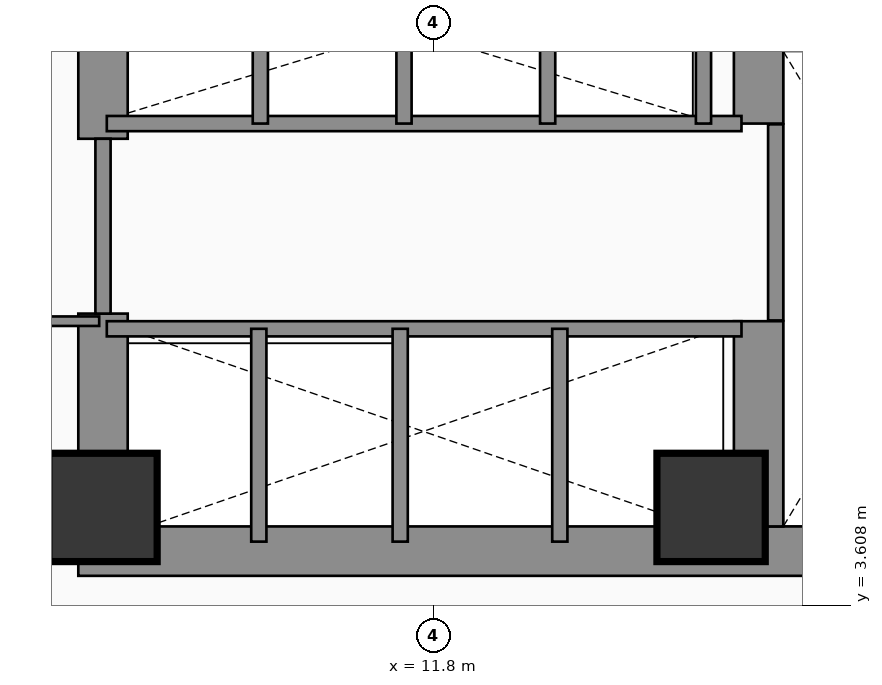
"""IFC4 building model, lengths in metres.
Left out: names, types, materials, properties, quantities, classifications, styles, units other than length and angle.
Written with IfcOpenShell. Run it as: python <this file> out.ifc"""

import sys

from ifc_helpers import new_model, si_unit, direction, frame, frame_2d, origin, origin_2d, place, context, subcontext, project, spatial, rectangle, extrude, element, fill, save


model = new_model("IFC4")
c1 = context("Model", 3, precision=1e-05, world=origin(), true_north=direction((0.0, 1.0)))
c2 = subcontext(c1, "Body", "Model", "MODEL_VIEW")
j1 = project(units=[si_unit("LENGTHUNIT", "METRE"), si_unit("PLANEANGLEUNIT", "RADIAN")], contexts=[c1])
p1 = place(None, origin())
s1 = spatial("IfcSite", under=j1, at=p1, CompositionType="ELEMENT")
p2 = place(p1, origin())
s2 = spatial("IfcBuilding", under=s1, at=p2, CompositionType="ELEMENT")
p3 = place(p2, frame((0.0, 0.0, 110.7)))
s3 = spatial("IfcBuildingStorey", under=s2, at=p3, CompositionType="ELEMENT", Elevation=110.7)
p4 = place(p3, frame((7.125, 4.325, 0.0), z_axis=(0.0, 0.0, 1.0), x_axis=(1.0, 0.0, 0.0)))
e1 = element("IfcWall", 1, at=p4, inside=s3, PredefinedType="SHEAR", context=c2, shape_type="SweptSolid", body=[
    extrude(rectangle(XDim=14.0, YDim=0.65, at=frame_2d((7.0, 0.0))), origin(), (0.0, 0.0, 1.0), 3.54),
])
p5 = place(p3, frame((7.45, 4.65, 0.0), z_axis=(0.0, 0.0, 1.0), x_axis=(0.0, 1.0, 0.0)))
e2 = element("IfcWall", 2, at=p5, inside=s3, PredefinedType="SHEAR", context=c2, shape_type="SweptSolid", body=[
    extrude(rectangle(XDim=2.8, YDim=0.65, at=frame_2d((1.4, 0.0))), origin(), (0.0, 0.0, 1.0), 3.54),
])
p6 = place(p3, frame((7.45, 9.75, 0.0), z_axis=(0.0, 0.0, 1.0), x_axis=(0.0, 1.0, 0.0)))
e3 = element("IfcWall", 3, at=p6, inside=s3, PredefinedType="SHEAR", context=c2, shape_type="SweptSolid", body=[
    extrude(rectangle(XDim=2.4, YDim=0.65, at=frame_2d((1.2, 0.0))), origin(), (0.0, 0.0, 1.0), 3.54),
])
p7 = place(p3, frame((16.075, 4.65, 0.0), z_axis=(0.0, 0.0, 1.0), x_axis=(0.0, 1.0, 0.0)))
e4 = element("IfcWall", 4, at=p7, inside=s3, PredefinedType="SHEAR", context=c2, shape_type="SweptSolid", body=[
    extrude(rectangle(XDim=2.7, YDim=0.65, at=frame_2d((1.35, 0.0))), origin(), (0.0, 0.0, 1.0), 3.54),
])
p8 = place(p3, frame((16.075, 9.95, 0.0), z_axis=(0.0, 0.0, 1.0), x_axis=(0.0, 1.0, 0.0)))
e5 = element("IfcWall", 5, at=p8, inside=s3, PredefinedType="SHEAR", context=c2, shape_type="SweptSolid", body=[
    extrude(rectangle(XDim=2.15, YDim=0.65, at=frame_2d((1.075, 0.0))), origin(), (0.0, 0.0, 1.0), 3.54),
])
for number, where, z_axis, x_axis in (
    (6, (7.45, 4.9, 0.0), (0.0, 0.0, 1.0), (1.0, 0.0, 0.0)),
    (7, (15.45, 4.9, 0.0), (0.0, 0.0, 1.0), (1.0, 0.0, 0.0)),
):
    element("IfcColumn", number, at=place(p3, frame(where, z_axis=z_axis, x_axis=x_axis)), inside=s3, PredefinedType="COLUMN", context=c2, shape_type="SweptSolid", body=[
        extrude(rectangle(XDim=1.4, YDim=1.4, at=origin_2d()), origin(), (0.0, 0.0, 1.0), 3.54),
    ])
p9 = place(p3, frame((16.3, 7.36, 0.0), z_axis=(0.0, 0.0, 1.0), x_axis=(0.0, 1.0, 0.0)))
e8 = element("IfcWall", 8, at=p9, inside=s3, PredefinedType="SHEAR", context=c2, shape_type="SweptSolid", body=[
    extrude(rectangle(XDim=2.58, YDim=0.2, at=frame_2d((1.29, 0.0))), origin(), (0.0, 0.0, 1.0), 3.54),
])
p10 = place(p3, frame((7.5, 7.25, 0.0), z_axis=(0.0, 0.0, 1.0), x_axis=(1.0, 0.0, 0.0)))
e9 = element("IfcWall", 9, at=p10, inside=s3, PredefinedType="PARTITIONING", context=c2, shape_type="SweptSolid", body=[
    extrude(rectangle(XDim=8.35, YDim=0.2, at=frame_2d((4.175, 0.0))), origin(), (0.0, 0.0, 1.0), 3.54),
])
p11 = place(p10, frame((0.53, 0.0, 0.0)))
e10 = element("IfcOpeningElement", 10, at=p11, cuts=e9, PredefinedType="OPENING", context=c2, shape_type="SweptSolid", body=[
    extrude(rectangle(XDim=1.1, YDim=2.2, at=frame_2d((0.55, 1.1))), frame((0.0, 0.11, 0.0), z_axis=(0.0, -1.0, 0.0), x_axis=(1.0, 0.0, 0.0)), (0.0, 0.0, 1.0), 0.22),
])
p12 = place(p10, frame((2.37, 0.0, 0.0)))
e11 = element("IfcOpeningElement", 11, at=p12, cuts=e9, PredefinedType="OPENING", context=c2, shape_type="SweptSolid", body=[
    extrude(rectangle(XDim=1.1, YDim=2.2, at=frame_2d((0.55, 1.1))), frame((0.0, 0.11, 0.0), z_axis=(0.0, -1.0, 0.0), x_axis=(1.0, 0.0, 0.0)), (0.0, 0.0, 1.0), 0.22),
])
p13 = place(p10, frame((4.33, 0.0, 0.0)))
e12 = element("IfcOpeningElement", 12, at=p13, cuts=e9, PredefinedType="OPENING", context=c2, shape_type="SweptSolid", body=[
    extrude(rectangle(XDim=1.1, YDim=2.2, at=frame_2d((0.55, 1.1))), frame((0.0, 0.11, 0.0), z_axis=(0.0, -1.0, 0.0), x_axis=(1.0, 0.0, 0.0)), (0.0, 0.0, 1.0), 0.22),
])
p14 = place(p10, frame((6.5, 0.0, 0.0)))
e13 = element("IfcOpeningElement", 13, at=p14, cuts=e9, PredefinedType="OPENING", context=c2, shape_type="SweptSolid", body=[
    extrude(rectangle(XDim=1.1, YDim=2.2, at=frame_2d((0.55, 1.1))), frame((0.0, 0.11, 0.0), z_axis=(0.0, -1.0, 0.0), x_axis=(1.0, 0.0, 0.0)), (0.0, 0.0, 1.0), 0.22),
])
p15 = place(p3, frame((7.5, 9.95, 0.0), z_axis=(0.0, 0.0, 1.0), x_axis=(1.0, 0.0, 0.0)))
e14 = element("IfcWall", 14, at=p15, inside=s3, PredefinedType="PARTITIONING", context=c2, shape_type="SweptSolid", body=[
    extrude(rectangle(XDim=8.35, YDim=0.2, at=frame_2d((4.175, 0.0))), origin(), (0.0, 0.0, 1.0), 3.54),
])
for number, where, z_axis, x_axis in (
    (15, (9.5, 4.45, 0.0), (0.0, 0.0, 1.0), (0.0, 1.0, 0.0)),
    (16, (11.36, 4.45, 0.0), (0.0, 0.0, 1.0), (0.0, 1.0, 0.0)),
    (17, (13.46, 4.45, 0.0), (0.0, 0.0, 1.0), (0.0, 1.0, 0.0)),
):
    element("IfcWall", number, at=place(p3, frame(where, z_axis=z_axis, x_axis=x_axis)), inside=s3, PredefinedType="PARTITIONING", context=c2, shape_type="SweptSolid", body=[
        extrude(rectangle(XDim=2.8, YDim=0.2, at=frame_2d((1.4, 0.0))), origin(), (0.0, 0.0, 1.0), 3.54),
    ])
p16 = place(p3, frame((7.45, 7.45, 0.0), z_axis=(0.0, 0.0, 1.0), x_axis=(0.0, 1.0, 0.0)))
e18 = element("IfcWall", 18, at=p16, inside=s3, PredefinedType="PARTITIONING", context=c2, shape_type="SweptSolid", body=[
    extrude(rectangle(XDim=2.3, YDim=0.2, at=frame_2d((1.15, 0.0))), origin(), (0.0, 0.0, 1.0), 2.52),
])
p17 = place(p16, frame((0.633, 0.0, 0.0)))
e19 = element("IfcOpeningElement", 19, at=p17, cuts=e18, PredefinedType="OPENING", context=c2, shape_type="SweptSolid", body=[
    extrude(rectangle(XDim=1.2, YDim=2.25, at=frame_2d((0.6, 1.125))), frame((0.0, 0.11, 0.0), z_axis=(0.0, -1.0, 0.0), x_axis=(1.0, 0.0, 0.0)), (0.0, 0.0, 1.0), 0.22),
])
for number, where, z_axis, x_axis in (
    (20, (15.35, 9.95, 0.0), (0.0, 0.0, 1.0), (0.0, 1.0, 0.0)),
    (21, (9.52, 9.95, 0.0), (0.0, 0.0, 1.0), (0.0, 1.0, 0.0)),
    (22, (11.41, 9.95, 0.0), (0.0, 0.0, 1.0), (0.0, 1.0, 0.0)),
    (23, (13.3, 9.95, 0.0), (0.0, 0.0, 1.0), (0.0, 1.0, 0.0)),
):
    element("IfcWall", number, at=place(p3, frame(where, z_axis=z_axis, x_axis=x_axis)), inside=s3, PredefinedType="PARTITIONING", context=c2, shape_type="SweptSolid", body=[
        extrude(rectangle(XDim=2.41, YDim=0.2, at=frame_2d((1.205, 0.0))), origin(), (0.0, 0.0, 1.0), 3.54),
    ])
p18 = place(p3, frame((1.64, 7.35, 0.0), z_axis=(0.0, 0.0, 1.0), x_axis=(1.0, 0.0, 0.0)))
e24 = element("IfcWall", 24, at=p18, inside=s3, PredefinedType="PARTITIONING", context=c2, shape_type="SweptSolid", body=[
    extrude(rectangle(XDim=5.76, YDim=0.125, at=frame_2d((2.88, 0.0))), origin(), (0.0, 0.0, 1.0), 3.54),
])
p19 = place(p18, frame((4.087, 0.0, 0.0)))
e25 = element("IfcOpeningElement", 25, at=p19, cuts=e24, PredefinedType="OPENING", context=c2, shape_type="SweptSolid", body=[
    extrude(rectangle(XDim=0.85, YDim=2.15, at=frame_2d((0.425, 1.075))), frame((0.0, 0.073, 0.0), z_axis=(0.0, -1.0, 0.0), x_axis=(1.0, 0.0, 0.0)), (0.0, 0.0, 1.0), 0.145),
])
p20 = place(p11, origin())
e26 = element("IfcDoor", 26, at=p20, inside=s3, OperationType="SLIDING_TO_LEFT", PredefinedType="DOOR", context=c2, shape_type="SweptSolid", body=[
    extrude(rectangle(XDim=1.1, YDim=2.2, at=frame_2d((0.55, 1.1))), frame((0.0, 0.025, 0.0), z_axis=(0.0, -1.0, 0.0), x_axis=(1.0, 0.0, 0.0)), (0.0, 0.0, 1.0), 0.05),
])
fill(e10, e26)
p21 = place(p12, origin())
e27 = element("IfcDoor", 27, at=p21, inside=s3, OperationType="SLIDING_TO_LEFT", PredefinedType="DOOR", context=c2, shape_type="SweptSolid", body=[
    extrude(rectangle(XDim=1.1, YDim=2.2, at=frame_2d((0.55, 1.1))), frame((0.0, 0.025, 0.0), z_axis=(0.0, -1.0, 0.0), x_axis=(1.0, 0.0, 0.0)), (0.0, 0.0, 1.0), 0.05),
])
fill(e11, e27)
p22 = place(p13, origin())
e28 = element("IfcDoor", 28, at=p22, inside=s3, OperationType="SLIDING_TO_LEFT", PredefinedType="DOOR", context=c2, shape_type="SweptSolid", body=[
    extrude(rectangle(XDim=1.1, YDim=2.2, at=frame_2d((0.55, 1.1))), frame((0.0, 0.025, 0.0), z_axis=(0.0, -1.0, 0.0), x_axis=(1.0, 0.0, 0.0)), (0.0, 0.0, 1.0), 0.05),
])
fill(e12, e28)
p23 = place(p14, origin())
e29 = element("IfcDoor", 29, at=p23, inside=s3, OperationType="SLIDING_TO_LEFT", PredefinedType="DOOR", context=c2, shape_type="SweptSolid", body=[
    extrude(rectangle(XDim=1.1, YDim=2.2, at=frame_2d((0.55, 1.1))), frame((0.0, 0.025, 0.0), z_axis=(0.0, -1.0, 0.0), x_axis=(1.0, 0.0, 0.0)), (0.0, 0.0, 1.0), 0.05),
])
fill(e13, e29)
p24 = place(p17, frame((1.2, 0.0, 0.0), z_axis=(0.0, 0.0, 1.0), x_axis=(-1.0, 0.0, 0.0)))
e30 = element("IfcDoor", 30, at=p24, inside=s3, OperationType="SINGLE_SWING_LEFT", PredefinedType="DOOR", context=c2, shape_type="SweptSolid", body=[
    extrude(rectangle(XDim=1.2, YDim=2.25, at=frame_2d((0.6, 1.125))), frame((0.0, 0.025, 0.0), z_axis=(0.0, -1.0, 0.0), x_axis=(1.0, 0.0, 0.0)), (0.0, 0.0, 1.0), 0.05),
])
fill(e19, e30)
save(model, sys.argv[1])
